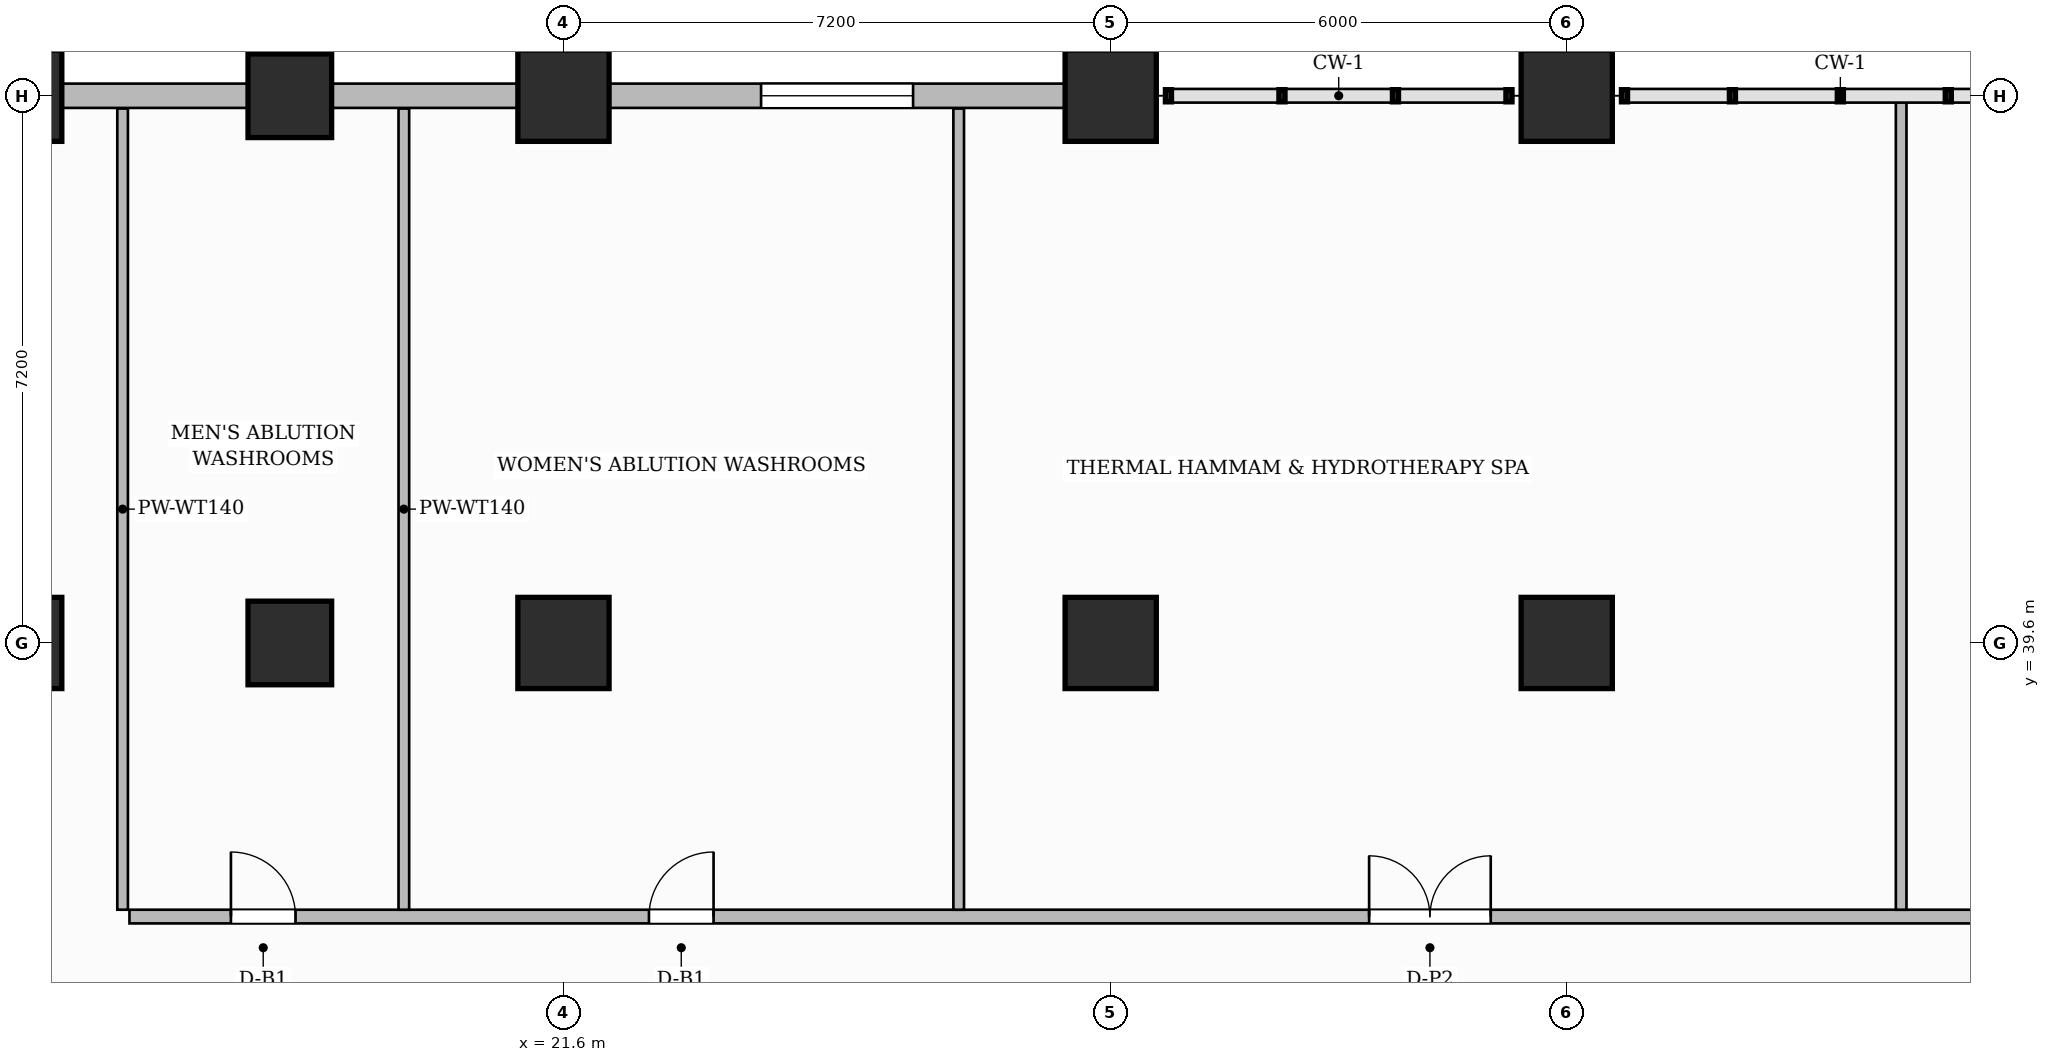
"""IFC4 building model, lengths in metres.
Left out: names, types, materials, properties, quantities, classifications, styles, units other than length and angle.
Written with IfcOpenShell. Run it as: python <this file> out.ifc"""

import sys

from ifc_helpers import new_model, si_unit, direction, frame, frame_2d, origin, origin_2d, place, context, subcontext, project, spatial, rectangle, extrude, source, transform, mapped, element, fill, save


model = new_model("IFC4")
c1 = context("Model", 3, precision=1e-05, world=origin(), true_north=direction((0.0, 1.0)))
c2 = subcontext(c1, "Body", "Model", "MODEL_VIEW")
j1 = project(units=[si_unit("LENGTHUNIT", "METRE"), si_unit("PLANEANGLEUNIT", "RADIAN")], contexts=[c1])
p1 = place(None, origin())
s1 = spatial("IfcSite", under=j1, at=p1, CompositionType="ELEMENT")
p2 = place(p1, origin())
s2 = spatial("IfcBuilding", under=s1, at=p2, CompositionType="ELEMENT")
p3 = place(p2, frame((0.0, 0.0, 21.6)))
s3 = spatial("IfcBuildingStorey", under=s2, at=p3, CompositionType="ELEMENT", Elevation=21.6)
m1 = source(origin(), c2, "Body", "SweptSolid", [
    extrude(rectangle(XDim=1.2, YDim=1.2, at=origin_2d()), origin(), (0.0, 0.0, 1.0), 5.4),
])
for number, where, z_axis, x_axis in (
    (1, (14.4, 39.6, 0.0), (0.0, 0.0, 1.0), (1.0, 0.0, 0.0)),
    (2, (14.4, 46.8, 0.0), (0.0, 0.0, 1.0), (1.0, 0.0, 0.0)),
    (3, (21.6, 39.6, 0.0), (0.0, 0.0, 1.0), (1.0, 0.0, 0.0)),
    (4, (21.6, 46.8, 0.0), (0.0, 0.0, 1.0), (1.0, 0.0, 0.0)),
    (5, (28.8, 39.6, 0.0), (0.0, 0.0, 1.0), (1.0, 0.0, 0.0)),
    (6, (28.8, 46.8, 0.0), (0.0, 0.0, 1.0), (1.0, 0.0, 0.0)),
    (7, (34.8, 39.6, 0.0), (0.0, 0.0, 1.0), (1.0, 0.0, 0.0)),
    (8, (34.8, 46.8, 0.0), (0.0, 0.0, 1.0), (1.0, 0.0, 0.0)),
):
    element("IfcColumn", number, at=place(p3, frame(where, z_axis=z_axis, x_axis=x_axis)), inside=s3, PredefinedType="COLUMN", context=c2, shape_type="MappedRepresentation", body=[
        mapped(m1, transform((0.0, 0.0, 0.0), scale=1.0)),
    ])
m2 = source(origin(), c2, "Body", "SweptSolid", [
    extrude(rectangle(XDim=1.1, YDim=1.1, at=origin_2d()), origin(), (0.0, 0.0, 1.0), 5.4),
])
for number, where, z_axis, x_axis in (
    (9, (18.0, 39.6, 0.0), (0.0, 0.0, 1.0), (1.0, 0.0, 0.0)),
    (10, (18.0, 46.8, 0.0), (0.0, 0.0, 1.0), (1.0, 0.0, 0.0)),
):
    element("IfcColumn", number, at=place(p3, frame(where, z_axis=z_axis, x_axis=x_axis)), inside=s3, PredefinedType="COLUMN", context=c2, shape_type="MappedRepresentation", body=[
        mapped(m2, transform((0.0, 0.0, 0.0), scale=1.0)),
    ])
p4 = place(p3, frame((15.8, 36.09, 0.0), z_axis=(0.0, 0.0, 1.0), x_axis=(0.0, 1.0, 0.0)))
e11 = element("IfcWall", 11, at=p4, inside=s3, PredefinedType="PARTITIONING", context=c2, shape_type="SweptSolid", body=[
    extrude(rectangle(XDim=10.542, YDim=0.14, at=frame_2d((5.271, 0.0))), origin(), (0.0, 0.0, 1.0), 5.1),
])
p5 = place(p3, frame((15.89, 36.0, 0.0), z_axis=(0.0, 0.0, 1.0), x_axis=(1.0, 0.0, 0.0)))
e12 = element("IfcWall", 12, at=p5, inside=s3, PredefinedType="PARTITIONING", context=c2, shape_type="SweptSolid", body=[
    extrude(rectangle(XDim=56.47, YDim=0.18, at=frame_2d((28.235, 0.0))), origin(), (0.0, 0.0, 1.0), 2.85),
])
p6 = place(p5, frame((1.335, 0.0, 0.0)))
e13 = element("IfcOpeningElement", 13, at=p6, cuts=e12, PredefinedType="OPENING", context=c2, shape_type="SweptSolid", body=[
    extrude(rectangle(XDim=0.85, YDim=2.1, at=frame_2d((0.425, 1.05))), frame((0.0, 0.1, 0.0), z_axis=(0.0, -1.0, 0.0), x_axis=(1.0, 0.0, 0.0)), (0.0, 0.0, 1.0), 0.2),
])
p7 = place(p5, frame((6.835, 0.0, 0.0)))
e14 = element("IfcOpeningElement", 14, at=p7, cuts=e12, PredefinedType="OPENING", context=c2, shape_type="SweptSolid", body=[
    extrude(rectangle(XDim=0.85, YDim=2.1, at=frame_2d((0.425, 1.05))), frame((0.0, 0.1, 0.0), z_axis=(0.0, -1.0, 0.0), x_axis=(1.0, 0.0, 0.0)), (0.0, 0.0, 1.0), 0.2),
])
p8 = place(p5, frame((16.31, 0.0, 0.0)))
e15 = element("IfcOpeningElement", 15, at=p8, cuts=e12, PredefinedType="OPENING", context=c2, shape_type="SweptSolid", body=[
    extrude(rectangle(XDim=1.6, YDim=2.4, at=frame_2d((0.8, 1.2))), frame((0.0, 0.1, 0.0), z_axis=(0.0, -1.0, 0.0), x_axis=(1.0, 0.0, 0.0)), (0.0, 0.0, 1.0), 0.2),
])
p9 = place(p5, frame((29.01, 0.0, 0.0)))
e16 = element("IfcOpeningElement", 16, at=p9, cuts=e12, PredefinedType="OPENING", context=c2, shape_type="SweptSolid", body=[
    extrude(rectangle(XDim=1.6, YDim=2.4, at=frame_2d((0.8, 1.2))), frame((0.0, 0.1, 0.0), z_axis=(0.0, -1.0, 0.0), x_axis=(1.0, 0.0, 0.0)), (0.0, 0.0, 1.0), 0.2),
])
p10 = place(p5, frame((40.91, 0.0, 0.0)))
e17 = element("IfcOpeningElement", 17, at=p10, cuts=e12, PredefinedType="OPENING", context=c2, shape_type="SweptSolid", body=[
    extrude(rectangle(XDim=1.6, YDim=2.4, at=frame_2d((0.8, 1.2))), frame((0.0, 0.1, 0.0), z_axis=(0.0, -1.0, 0.0), x_axis=(1.0, 0.0, 0.0)), (0.0, 0.0, 1.0), 0.2),
])
p11 = place(p5, frame((47.86, 0.0, 0.0)))
e18 = element("IfcOpeningElement", 18, at=p11, cuts=e12, PredefinedType="OPENING", context=c2, shape_type="SweptSolid", body=[
    extrude(rectangle(XDim=0.85, YDim=2.1, at=frame_2d((0.425, 1.05))), frame((0.0, 0.1, 0.0), z_axis=(0.0, -1.0, 0.0), x_axis=(1.0, 0.0, 0.0)), (0.0, 0.0, 1.0), 0.2),
])
p12 = place(p5, frame((52.585, 0.0, 0.0)))
e19 = element("IfcOpeningElement", 19, at=p12, cuts=e12, PredefinedType="OPENING", context=c2, shape_type="SweptSolid", body=[
    extrude(rectangle(XDim=0.85, YDim=2.1, at=frame_2d((0.425, 1.05))), frame((0.0, 0.1, 0.0), z_axis=(0.0, -1.0, 0.0), x_axis=(1.0, 0.0, 0.0)), (0.0, 0.0, 1.0), 0.2),
])
for number, where, z_axis, x_axis in (
    (20, (19.5, 36.09, 0.0), (0.0, 0.0, 1.0), (0.0, 1.0, 0.0)),
    (21, (26.8, 36.09, 0.0), (0.0, 0.0, 1.0), (0.0, 1.0, 0.0)),
):
    element("IfcWall", number, at=place(p3, frame(where, z_axis=z_axis, x_axis=x_axis)), inside=s3, PredefinedType="PARTITIONING", context=c2, shape_type="SweptSolid", body=[
        extrude(rectangle(XDim=10.542, YDim=0.14, at=frame_2d((5.271, 0.0))), origin(), (0.0, 0.0, 1.0), 5.1),
    ])
p13 = place(p3, frame((39.2, 36.09, 0.0), z_axis=(0.0, 0.0, 1.0), x_axis=(0.0, 1.0, 0.0)))
e22 = element("IfcWall", 22, at=p13, inside=s3, PredefinedType="PARTITIONING", context=c2, shape_type="SweptSolid", body=[
    extrude(rectangle(XDim=10.682, YDim=0.14, at=frame_2d((5.341, 0.0))), origin(), (0.0, 0.0, 1.0), 5.1),
])
p14 = place(p3, frame((-4.8, 46.8, 0.0), z_axis=(0.0, 0.0, 1.0), x_axis=(1.0, 0.0, 0.0)))
e23 = element("IfcWall", 23, at=p14, inside=s3, PredefinedType="SOLIDWALL", context=c2, shape_type="SweptSolid", body=[
    extrude(rectangle(XDim=33.6, YDim=0.32, at=frame_2d((16.8, 0.0))), origin(), (0.0, 0.0, 1.0), 4.085),
])
p15 = place(p14, frame((1.4, 0.0, 0.75)))
e24 = element("IfcOpeningElement", 24, at=p15, cuts=e23, PredefinedType="OPENING", context=c2, shape_type="SweptSolid", body=[
    extrude(rectangle(XDim=2.0, YDim=2.6, at=frame_2d((1.0, 1.3))), frame((0.0, 0.17, 0.0), z_axis=(0.0, -1.0, 0.0), x_axis=(1.0, 0.0, 0.0)), (0.0, 0.0, 1.0), 0.34),
])
p16 = place(p14, frame((7.4, 0.0, 0.75)))
e25 = element("IfcOpeningElement", 25, at=p16, cuts=e23, PredefinedType="OPENING", context=c2, shape_type="SweptSolid", body=[
    extrude(rectangle(XDim=2.0, YDim=2.6, at=frame_2d((1.0, 1.3))), frame((0.0, 0.17, 0.0), z_axis=(0.0, -1.0, 0.0), x_axis=(1.0, 0.0, 0.0)), (0.0, 0.0, 1.0), 0.34),
])
p17 = place(p14, frame((14.6, 0.0, 0.75)))
e26 = element("IfcOpeningElement", 26, at=p17, cuts=e23, PredefinedType="OPENING", context=c2, shape_type="SweptSolid", body=[
    extrude(rectangle(XDim=2.0, YDim=2.6, at=frame_2d((1.0, 1.3))), frame((0.0, 0.17, 0.0), z_axis=(0.0, -1.0, 0.0), x_axis=(1.0, 0.0, 0.0)), (0.0, 0.0, 1.0), 0.34),
])
p18 = place(p14, frame((29.0, 0.0, 0.75)))
e27 = element("IfcOpeningElement", 27, at=p18, cuts=e23, PredefinedType="OPENING", context=c2, shape_type="SweptSolid", body=[
    extrude(rectangle(XDim=2.0, YDim=2.6, at=frame_2d((1.0, 1.3))), frame((0.0, 0.17, 0.0), z_axis=(0.0, -1.0, 0.0), x_axis=(1.0, 0.0, 0.0)), (0.0, 0.0, 1.0), 0.34),
])
m3 = source(origin(), c2, "Body", "SweptSolid", [
    extrude(rectangle(XDim=0.85, YDim=2.1, at=frame_2d((0.425, 1.05))), frame((0.0, 0.025, 0.0), z_axis=(0.0, -1.0, 0.0), x_axis=(1.0, 0.0, 0.0)), (0.0, 0.0, 1.0), 0.05),
])
p19 = place(p6, origin())
e28 = element("IfcDoor", 28, at=p19, inside=s3, OperationType="SINGLE_SWING_LEFT", PredefinedType="DOOR", context=c2, shape_type="MappedRepresentation", body=[
    mapped(m3, transform((0.0, 0.0, 0.0), scale=1.0)),
])
fill(e13, e28)
p20 = place(p7, origin())
e29 = element("IfcDoor", 29, at=p20, inside=s3, OperationType="SINGLE_SWING_RIGHT", PredefinedType="DOOR", context=c2, shape_type="MappedRepresentation", body=[
    mapped(m3, transform((0.0, 0.0, 0.0), scale=1.0)),
])
fill(e14, e29)
m4 = source(origin(), c2, "Body", "SweptSolid", [
    extrude(rectangle(XDim=1.6, YDim=2.4, at=frame_2d((0.8, 1.2))), frame((0.0, 0.025, 0.0), z_axis=(0.0, -1.0, 0.0), x_axis=(1.0, 0.0, 0.0)), (0.0, 0.0, 1.0), 0.05),
])
p21 = place(p8, origin())
e30 = element("IfcDoor", 30, at=p21, inside=s3, OperationType="DOUBLE_DOOR_SINGLE_SWING", PredefinedType="DOOR", context=c2, shape_type="MappedRepresentation", body=[
    mapped(m4, transform((0.0, 0.0, 0.0), scale=1.0)),
])
fill(e15, e30)
m5 = source(origin(), c2, "Body", "SweptSolid", [
    extrude(rectangle(XDim=2.0, YDim=2.6, at=frame_2d((1.0, 1.3))), frame((0.0, 0.03, 0.0), z_axis=(0.0, -1.0, 0.0), x_axis=(1.0, 0.0, 0.0)), (0.0, 0.0, 1.0), 0.06),
])
p22 = place(p18, origin())
e31 = element("IfcWindow", 31, at=p22, inside=s3, PartitioningType="DOUBLE_PANEL_VERTICAL", PredefinedType="WINDOW", context=c2, shape_type="MappedRepresentation", body=[
    mapped(m5, transform((0.0, 0.0, 0.0), scale=1.0)),
])
fill(e27, e31)
save(model, sys.argv[1])
